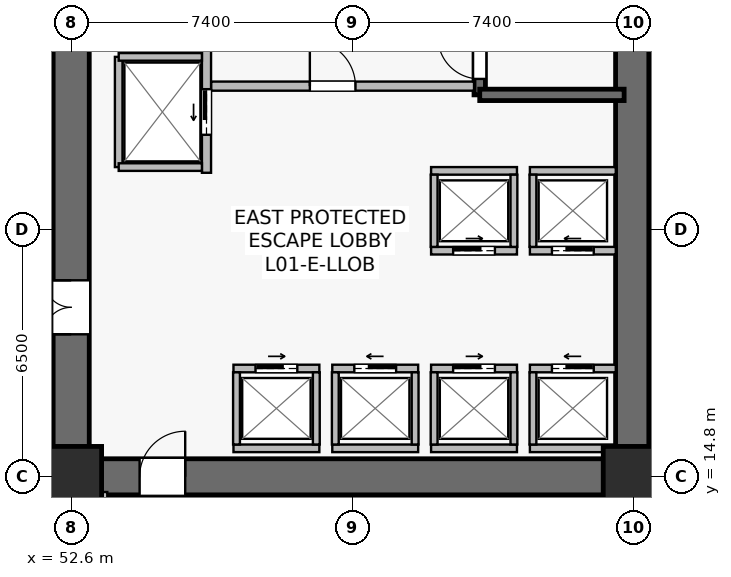
"""IFC4 building model, lengths in metres.
Left out: names, types, materials, properties, quantities, classifications, styles, units other than length and angle.
Written with IfcOpenShell. Run it as: python <this file> out.ifc"""

import sys

from ifc_helpers import new_model, si_unit, direction, frame, frame_2d, origin, origin_2d, place, context, subcontext, project, spatial, rectangle, extrude, source, transform, mapped, element, fill, save


model = new_model("IFC4")
c1 = context("Model", 3, precision=1e-05, world=origin(), true_north=direction((0.0, 1.0)))
c2 = subcontext(c1, "Body", "Model", "MODEL_VIEW")
j1 = project(units=[si_unit("LENGTHUNIT", "METRE"), si_unit("PLANEANGLEUNIT", "RADIAN")], contexts=[c1])
p1 = place(None, origin())
s1 = spatial("IfcSite", under=j1, at=p1, CompositionType="ELEMENT")
p2 = place(p1, origin())
s2 = spatial("IfcBuilding", under=s1, at=p2, CompositionType="ELEMENT")
p3 = place(p2, origin())
s3 = spatial("IfcBuildingStorey", under=s2, at=p3, CompositionType="ELEMENT", Elevation=0.0)
p4 = place(p3, frame((52.125, 14.8, 0.0), z_axis=(0.0, 0.0, 1.0), x_axis=(1.0, 0.0, 0.0)))
e1 = element("IfcWall", 1, at=p4, inside=s3, PredefinedType="SHEAR", context=c2, shape_type="SweptSolid", body=[
    extrude(rectangle(XDim=15.75, YDim=0.95, at=frame_2d((7.875, 0.0))), origin(), (0.0, 0.0, 1.0), 5.05),
])
p5 = place(p4, frame((2.275, 0.0, 0.0)))
e2 = element("IfcOpeningElement", 2, at=p5, cuts=e1, PredefinedType="OPENING", context=c2, shape_type="SweptSolid", body=[
    extrude(rectangle(XDim=1.2, YDim=2.16, at=frame_2d((0.6, 1.08))), frame((0.0, 0.485, 0.0), z_axis=(0.0, -1.0, 0.0), x_axis=(1.0, 0.0, 0.0)), (0.0, 0.0, 1.0), 0.97),
])
p6 = place(p3, frame((52.6, 15.275, 0.0), z_axis=(0.0, 0.0, 1.0), x_axis=(0.0, 1.0, 0.0)))
e3 = element("IfcWall", 3, at=p6, inside=s3, PredefinedType="SHEAR", context=c2, shape_type="SweptSolid", body=[
    extrude(rectangle(XDim=18.05, YDim=0.95, at=frame_2d((9.025, 0.0))), origin(), (0.0, 0.0, 1.0), 5.05),
])
p7 = place(p6, frame((3.275, 0.0, 0.0)))
e4 = element("IfcOpeningElement", 4, at=p7, cuts=e3, PredefinedType="OPENING", context=c2, shape_type="SweptSolid", body=[
    extrude(rectangle(XDim=1.42, YDim=2.2, at=frame_2d((0.71, 1.1))), frame((0.0, 0.485, 0.0), z_axis=(0.0, -1.0, 0.0), x_axis=(1.0, 0.0, 0.0)), (0.0, 0.0, 1.0), 0.97),
])
p8 = place(p3, frame((67.4, 15.275, 0.0), z_axis=(0.0, 0.0, 1.0), x_axis=(0.0, 1.0, 0.0)))
e5 = element("IfcWall", 5, at=p8, inside=s3, PredefinedType="SHEAR", context=c2, shape_type="SweptSolid", body=[
    extrude(rectangle(XDim=18.05, YDim=0.95, at=frame_2d((9.025, 0.0))), origin(), (0.0, 0.0, 1.0), 5.05),
])
p9 = place(p3, frame((63.35, 24.85, 0.0), z_axis=(0.0, 0.0, 1.0), x_axis=(0.0, 1.0, 0.0)))
e6 = element("IfcWall", 6, at=p9, inside=s3, PredefinedType="SHEAR", context=c2, shape_type="SweptSolid", body=[
    extrude(rectangle(XDim=8.63, YDim=0.3, at=frame_2d((4.315, 0.0))), origin(), (0.0, 0.0, 1.0), 5.05),
])
p10 = place(p9, frame((0.42, 0.0, 0.0)))
e7 = element("IfcOpeningElement", 7, at=p10, cuts=e6, PredefinedType="OPENING", context=c2, shape_type="SweptSolid", body=[
    extrude(rectangle(XDim=1.1, YDim=2.15, at=frame_2d((0.55, 1.075))), frame((0.0, 0.16, 0.0), z_axis=(0.0, -1.0, 0.0), x_axis=(1.0, 0.0, 0.0)), (0.0, 0.0, 1.0), 0.32),
])
p11 = place(p3, frame((63.35, 24.85, 0.0), z_axis=(0.0, 0.0, 1.0), x_axis=(1.0, 0.0, 0.0)))
e8 = element("IfcWall", 8, at=p11, inside=s3, PredefinedType="SHEAR", context=c2, shape_type="SweptSolid", body=[
    extrude(rectangle(XDim=3.8, YDim=0.3, at=frame_2d((1.9, 0.0))), origin(), (0.0, 0.0, 1.0), 5.05),
])
p12 = place(p3, frame((68.0, 6.0, 0.0), z_axis=(0.0, 0.0, 1.0), x_axis=(0.0, 1.0, 0.0)))
e9 = element("IfcWall", 9, at=p12, inside=s3, PredefinedType="SHEAR", context=c2, shape_type="SweptSolid", body=[
    extrude(rectangle(XDim=43.0, YDim=0.4, at=frame_2d((21.5, 0.0))), origin(), (0.0, 0.0, 1.0), 5.05),
])
m1 = source(origin(), c2, "Body", "SweptSolid", [
    extrude(rectangle(XDim=1.6, YDim=1.6, at=origin_2d()), origin(), (0.0, 0.0, 1.0), 5.4),
])
for number, where, z_axis, x_axis in (
    (10, (52.6, 14.8, 0.0), (0.0, 0.0, 1.0), (1.0, 0.0, 0.0)),
    (11, (67.4, 14.8, 0.0), (0.0, 0.0, 1.0), (1.0, 0.0, 0.0)),
):
    element("IfcColumn", number, at=place(p3, frame(where, z_axis=z_axis, x_axis=x_axis)), inside=s3, PredefinedType="COLUMN", context=c2, shape_type="MappedRepresentation", body=[
        mapped(m1, transform((0.0, 0.0, 0.0), scale=1.0)),
    ])
p13 = place(p3, frame((56.28, 25.08, 0.0), z_axis=(0.0, 0.0, 1.0), x_axis=(1.0, 0.0, 0.0)))
e12 = element("IfcWall", 12, at=p13, inside=s3, PredefinedType="SOLIDWALL", context=c2, shape_type="SweptSolid", body=[
    extrude(rectangle(XDim=6.92, YDim=0.24, at=frame_2d((3.46, 0.0))), origin(), (0.0, 0.0, 1.0), 4.335),
])
p14 = place(p13, frame((2.6, 0.0, 0.0)))
e13 = element("IfcOpeningElement", 13, at=p14, cuts=e12, PredefinedType="OPENING", context=c2, shape_type="SweptSolid", body=[
    extrude(rectangle(XDim=1.2, YDim=2.16, at=frame_2d((0.6, 1.08))), frame((0.0, 0.13, 0.0), z_axis=(0.0, -1.0, 0.0), x_axis=(1.0, 0.0, 0.0)), (0.0, 0.0, 1.0), 0.26),
])
p15 = place(p3, frame((56.16, 22.8, 0.0), z_axis=(0.0, 0.0, 1.0), x_axis=(0.0, 1.0, 0.0)))
e14 = element("IfcWall", 14, at=p15, inside=s3, PredefinedType="SOLIDWALL", context=c2, shape_type="SweptSolid", body=[
    extrude(rectangle(XDim=6.85, YDim=0.24, at=frame_2d((3.425, 0.0))), origin(), (0.0, 0.0, 1.0), 4.135),
])
p16 = place(p15, frame((4.85, 0.0, 0.0)))
e15 = element("IfcOpeningElement", 15, at=p16, cuts=e14, PredefinedType="OPENING", context=c2, shape_type="SweptSolid", body=[
    extrude(rectangle(XDim=1.1, YDim=2.22, at=frame_2d((0.55, 1.11))), frame((0.0, 0.13, 0.0), z_axis=(0.0, -1.0, 0.0), x_axis=(1.0, 0.0, 0.0)), (0.0, 0.0, 1.0), 0.26),
])
p17 = place(p15, frame((1.0, 0.0, 0.0)))
e16 = element("IfcOpeningElement", 16, at=p17, cuts=e14, PredefinedType="OPENING", context=c2, shape_type="SweptSolid", body=[
    extrude(rectangle(XDim=1.2, YDim=2.22, at=frame_2d((0.6, 1.11))), frame((0.0, 0.13, 0.0), z_axis=(0.0, -1.0, 0.0), x_axis=(1.0, 0.0, 0.0)), (0.0, 0.0, 1.0), 0.26),
])
p18 = place(p3, frame((64.67, 17.65, 0.0), z_axis=(0.0, 0.0, 1.0), x_axis=(1.0, 0.0, 0.0)))
e17 = element("IfcWall", 17, at=p18, inside=s3, PredefinedType="SOLIDWALL", context=c2, shape_type="SweptSolid", body=[
    extrude(rectangle(XDim=2.26, YDim=0.2, at=frame_2d((1.13, 0.0))), origin(), (0.0, 0.0, 1.0), 5.05),
])
p19 = place(p18, frame((0.58, 0.0, 0.0)))
e18 = element("IfcOpeningElement", 18, at=p19, cuts=e17, PredefinedType="OPENING", context=c2, shape_type="SweptSolid", body=[
    extrude(rectangle(XDim=1.1, YDim=2.22, at=frame_2d((0.55, 1.11))), frame((0.0, 0.11, 0.0), z_axis=(0.0, -1.0, 0.0), x_axis=(1.0, 0.0, 0.0)), (0.0, 0.0, 1.0), 0.22),
])
p20 = place(p3, frame((64.67, 15.55, 0.0), z_axis=(0.0, 0.0, 1.0), x_axis=(1.0, 0.0, 0.0)))
e19 = element("IfcWall", 19, at=p20, inside=s3, PredefinedType="SOLIDWALL", context=c2, shape_type="SweptSolid", body=[
    extrude(rectangle(XDim=2.26, YDim=0.2, at=frame_2d((1.13, 0.0))), origin(), (0.0, 0.0, 1.0), 5.05),
])
p21 = place(p3, frame((64.75, 15.65, 0.0), z_axis=(0.0, 0.0, 1.0), x_axis=(0.0, 1.0, 0.0)))
e20 = element("IfcWall", 20, at=p21, inside=s3, PredefinedType="SOLIDWALL", context=c2, shape_type="SweptSolid", body=[
    extrude(rectangle(XDim=1.9, YDim=0.18, at=frame_2d((0.95, 0.0))), origin(), (0.0, 0.0, 1.0), 5.05),
])
p22 = place(p3, frame((62.07, 17.65, 0.0), z_axis=(0.0, 0.0, 1.0), x_axis=(1.0, 0.0, 0.0)))
e21 = element("IfcWall", 21, at=p22, inside=s3, PredefinedType="SOLIDWALL", context=c2, shape_type="SweptSolid", body=[
    extrude(rectangle(XDim=2.26, YDim=0.2, at=frame_2d((1.13, 0.0))), origin(), (0.0, 0.0, 1.0), 5.05),
])
p23 = place(p22, frame((0.58, 0.0, 0.0)))
e22 = element("IfcOpeningElement", 22, at=p23, cuts=e21, PredefinedType="OPENING", context=c2, shape_type="SweptSolid", body=[
    extrude(rectangle(XDim=1.1, YDim=2.22, at=frame_2d((0.55, 1.11))), frame((0.0, 0.11, 0.0), z_axis=(0.0, -1.0, 0.0), x_axis=(1.0, 0.0, 0.0)), (0.0, 0.0, 1.0), 0.22),
])
p24 = place(p3, frame((62.07, 15.55, 0.0), z_axis=(0.0, 0.0, 1.0), x_axis=(1.0, 0.0, 0.0)))
e23 = element("IfcWall", 23, at=p24, inside=s3, PredefinedType="SOLIDWALL", context=c2, shape_type="SweptSolid", body=[
    extrude(rectangle(XDim=2.26, YDim=0.2, at=frame_2d((1.13, 0.0))), origin(), (0.0, 0.0, 1.0), 5.05),
])
for number, where, z_axis, x_axis in (
    (24, (62.15, 15.65, 0.0), (0.0, 0.0, 1.0), (0.0, 1.0, 0.0)),
    (25, (64.25, 15.65, 0.0), (0.0, 0.0, 1.0), (0.0, 1.0, 0.0)),
):
    element("IfcWall", number, at=place(p3, frame(where, z_axis=z_axis, x_axis=x_axis)), inside=s3, PredefinedType="SOLIDWALL", context=c2, shape_type="SweptSolid", body=[
        extrude(rectangle(XDim=1.9, YDim=0.18, at=frame_2d((0.95, 0.0))), origin(), (0.0, 0.0, 1.0), 5.05),
    ])
p25 = place(p3, frame((59.47, 17.65, 0.0), z_axis=(0.0, 0.0, 1.0), x_axis=(1.0, 0.0, 0.0)))
e26 = element("IfcWall", 26, at=p25, inside=s3, PredefinedType="SOLIDWALL", context=c2, shape_type="SweptSolid", body=[
    extrude(rectangle(XDim=2.26, YDim=0.2, at=frame_2d((1.13, 0.0))), origin(), (0.0, 0.0, 1.0), 4.335),
])
p26 = place(p25, frame((0.58, 0.0, 0.0)))
e27 = element("IfcOpeningElement", 27, at=p26, cuts=e26, PredefinedType="OPENING", context=c2, shape_type="SweptSolid", body=[
    extrude(rectangle(XDim=1.1, YDim=2.22, at=frame_2d((0.55, 1.11))), frame((0.0, 0.11, 0.0), z_axis=(0.0, -1.0, 0.0), x_axis=(1.0, 0.0, 0.0)), (0.0, 0.0, 1.0), 0.22),
])
p27 = place(p3, frame((59.47, 15.55, 0.0), z_axis=(0.0, 0.0, 1.0), x_axis=(1.0, 0.0, 0.0)))
e28 = element("IfcWall", 28, at=p27, inside=s3, PredefinedType="SOLIDWALL", context=c2, shape_type="SweptSolid", body=[
    extrude(rectangle(XDim=2.26, YDim=0.2, at=frame_2d((1.13, 0.0))), origin(), (0.0, 0.0, 1.0), 4.335),
])
for number, where, z_axis, x_axis in (
    (29, (59.55, 15.65, 0.0), (0.0, 0.0, 1.0), (0.0, 1.0, 0.0)),
    (30, (61.65, 15.65, 0.0), (0.0, 0.0, 1.0), (0.0, 1.0, 0.0)),
):
    element("IfcWall", number, at=place(p3, frame(where, z_axis=z_axis, x_axis=x_axis)), inside=s3, PredefinedType="SOLIDWALL", context=c2, shape_type="SweptSolid", body=[
        extrude(rectangle(XDim=1.9, YDim=0.18, at=frame_2d((0.95, 0.0))), origin(), (0.0, 0.0, 1.0), 5.05),
    ])
p28 = place(p3, frame((56.87, 17.65, 0.0), z_axis=(0.0, 0.0, 1.0), x_axis=(1.0, 0.0, 0.0)))
e31 = element("IfcWall", 31, at=p28, inside=s3, PredefinedType="SOLIDWALL", context=c2, shape_type="SweptSolid", body=[
    extrude(rectangle(XDim=2.26, YDim=0.2, at=frame_2d((1.13, 0.0))), origin(), (0.0, 0.0, 1.0), 5.05),
])
p29 = place(p28, frame((0.58, 0.0, 0.0)))
e32 = element("IfcOpeningElement", 32, at=p29, cuts=e31, PredefinedType="OPENING", context=c2, shape_type="SweptSolid", body=[
    extrude(rectangle(XDim=1.1, YDim=2.22, at=frame_2d((0.55, 1.11))), frame((0.0, 0.11, 0.0), z_axis=(0.0, -1.0, 0.0), x_axis=(1.0, 0.0, 0.0)), (0.0, 0.0, 1.0), 0.22),
])
p30 = place(p3, frame((56.87, 15.55, 0.0), z_axis=(0.0, 0.0, 1.0), x_axis=(1.0, 0.0, 0.0)))
e33 = element("IfcWall", 33, at=p30, inside=s3, PredefinedType="SOLIDWALL", context=c2, shape_type="SweptSolid", body=[
    extrude(rectangle(XDim=2.26, YDim=0.2, at=frame_2d((1.13, 0.0))), origin(), (0.0, 0.0, 1.0), 5.05),
])
for number, where, z_axis, x_axis in (
    (34, (56.95, 15.65, 0.0), (0.0, 0.0, 1.0), (0.0, 1.0, 0.0)),
    (35, (59.05, 15.65, 0.0), (0.0, 0.0, 1.0), (0.0, 1.0, 0.0)),
):
    element("IfcWall", number, at=place(p3, frame(where, z_axis=z_axis, x_axis=x_axis)), inside=s3, PredefinedType="SOLIDWALL", context=c2, shape_type="SweptSolid", body=[
        extrude(rectangle(XDim=1.9, YDim=0.18, at=frame_2d((0.95, 0.0))), origin(), (0.0, 0.0, 1.0), 5.05),
    ])
p31 = place(p3, frame((64.67, 20.75, 0.0), z_axis=(0.0, 0.0, 1.0), x_axis=(1.0, 0.0, 0.0)))
e36 = element("IfcWall", 36, at=p31, inside=s3, PredefinedType="SOLIDWALL", context=c2, shape_type="SweptSolid", body=[
    extrude(rectangle(XDim=2.26, YDim=0.2, at=frame_2d((1.13, 0.0))), origin(), (0.0, 0.0, 1.0), 5.05),
])
p32 = place(p31, frame((0.58, 0.0, 0.0)))
e37 = element("IfcOpeningElement", 37, at=p32, cuts=e36, PredefinedType="OPENING", context=c2, shape_type="SweptSolid", body=[
    extrude(rectangle(XDim=1.1, YDim=2.22, at=frame_2d((0.55, 1.11))), frame((0.0, 0.11, 0.0), z_axis=(0.0, -1.0, 0.0), x_axis=(1.0, 0.0, 0.0)), (0.0, 0.0, 1.0), 0.22),
])
p33 = place(p3, frame((64.67, 22.85, 0.0), z_axis=(0.0, 0.0, 1.0), x_axis=(1.0, 0.0, 0.0)))
e38 = element("IfcWall", 38, at=p33, inside=s3, PredefinedType="SOLIDWALL", context=c2, shape_type="SweptSolid", body=[
    extrude(rectangle(XDim=2.26, YDim=0.2, at=frame_2d((1.13, 0.0))), origin(), (0.0, 0.0, 1.0), 5.05),
])
p34 = place(p3, frame((64.75, 20.85, 0.0), z_axis=(0.0, 0.0, 1.0), x_axis=(0.0, 1.0, 0.0)))
e39 = element("IfcWall", 39, at=p34, inside=s3, PredefinedType="SOLIDWALL", context=c2, shape_type="SweptSolid", body=[
    extrude(rectangle(XDim=1.9, YDim=0.18, at=frame_2d((0.95, 0.0))), origin(), (0.0, 0.0, 1.0), 5.05),
])
p35 = place(p3, frame((62.07, 20.75, 0.0), z_axis=(0.0, 0.0, 1.0), x_axis=(1.0, 0.0, 0.0)))
e40 = element("IfcWall", 40, at=p35, inside=s3, PredefinedType="SOLIDWALL", context=c2, shape_type="SweptSolid", body=[
    extrude(rectangle(XDim=2.26, YDim=0.2, at=frame_2d((1.13, 0.0))), origin(), (0.0, 0.0, 1.0), 5.05),
])
p36 = place(p35, frame((0.58, 0.0, 0.0)))
e41 = element("IfcOpeningElement", 41, at=p36, cuts=e40, PredefinedType="OPENING", context=c2, shape_type="SweptSolid", body=[
    extrude(rectangle(XDim=1.1, YDim=2.22, at=frame_2d((0.55, 1.11))), frame((0.0, 0.11, 0.0), z_axis=(0.0, -1.0, 0.0), x_axis=(1.0, 0.0, 0.0)), (0.0, 0.0, 1.0), 0.22),
])
p37 = place(p3, frame((62.07, 22.85, 0.0), z_axis=(0.0, 0.0, 1.0), x_axis=(1.0, 0.0, 0.0)))
e42 = element("IfcWall", 42, at=p37, inside=s3, PredefinedType="SOLIDWALL", context=c2, shape_type="SweptSolid", body=[
    extrude(rectangle(XDim=2.26, YDim=0.2, at=frame_2d((1.13, 0.0))), origin(), (0.0, 0.0, 1.0), 5.05),
])
for number, where, z_axis, x_axis in (
    (43, (62.15, 20.85, 0.0), (0.0, 0.0, 1.0), (0.0, 1.0, 0.0)),
    (44, (64.25, 20.85, 0.0), (0.0, 0.0, 1.0), (0.0, 1.0, 0.0)),
):
    element("IfcWall", number, at=place(p3, frame(where, z_axis=z_axis, x_axis=x_axis)), inside=s3, PredefinedType="SOLIDWALL", context=c2, shape_type="SweptSolid", body=[
        extrude(rectangle(XDim=1.9, YDim=0.18, at=frame_2d((0.95, 0.0))), origin(), (0.0, 0.0, 1.0), 5.05),
    ])
p38 = place(p3, frame((53.85, 22.95, 0.0), z_axis=(0.0, 0.0, 1.0), x_axis=(0.0, 1.0, 0.0)))
e45 = element("IfcWall", 45, at=p38, inside=s3, PredefinedType="SOLIDWALL", context=c2, shape_type="SweptSolid", body=[
    extrude(rectangle(XDim=2.9, YDim=0.2, at=frame_2d((1.45, 0.0))), origin(), (0.0, 0.0, 1.0), 4.135),
])
for number, where, z_axis, x_axis in (
    (46, (53.85, 25.85, 0.0), (0.0, 0.0, 1.0), (1.0, 0.0, 0.0)),
    (47, (53.85, 22.95, 0.0), (0.0, 0.0, 1.0), (1.0, 0.0, 0.0)),
):
    element("IfcWall", number, at=place(p3, frame(where, z_axis=z_axis, x_axis=x_axis)), inside=s3, PredefinedType="SOLIDWALL", context=c2, shape_type="SweptSolid", body=[
        extrude(rectangle(XDim=2.19, YDim=0.2, at=frame_2d((1.095, 0.0))), origin(), (0.0, 0.0, 1.0), 5.05),
    ])
p39 = place(p3, frame((53.45, 11.35, 0.0), z_axis=(0.0, 0.0, 1.0), x_axis=(0.0, 1.0, 0.0)))
e48 = element("IfcWall", 48, at=p39, inside=s3, PredefinedType="SOLIDWALL", context=c2, shape_type="SweptSolid", body=[
    extrude(rectangle(XDim=3.05, YDim=0.2, at=frame_2d((1.525, 0.0))), origin(), (0.0, 0.0, 1.0), 5.05),
])
p40 = place(p39, frame((0.45, 0.0, 0.0)))
e49 = element("IfcOpeningElement", 49, at=p40, cuts=e48, PredefinedType="OPENING", context=c2, shape_type="SweptSolid", body=[
    extrude(rectangle(XDim=1.42, YDim=2.2, at=frame_2d((0.71, 1.1))), frame((0.0, 0.11, 0.0), z_axis=(0.0, -1.0, 0.0), x_axis=(1.0, 0.0, 0.0)), (0.0, 0.0, 1.0), 0.22),
])
m2 = source(origin(), c2, "Body", "SweptSolid", [
    extrude(rectangle(XDim=1.1, YDim=2.15, at=frame_2d((0.55, 1.075))), frame((0.0, 0.025, 0.0), z_axis=(0.0, -1.0, 0.0), x_axis=(1.0, 0.0, 0.0)), (0.0, 0.0, 1.0), 0.05),
])
p41 = place(p10, origin())
e50 = element("IfcDoor", 50, at=p41, inside=s3, OperationType="SINGLE_SWING_RIGHT", PredefinedType="DOOR", context=c2, shape_type="MappedRepresentation", body=[
    mapped(m2, transform((0.0, 0.0, 0.0), scale=1.0)),
])
fill(e7, e50)
m3 = source(origin(), c2, "Body", "SweptSolid", [
    extrude(rectangle(XDim=1.2, YDim=2.16, at=frame_2d((0.6, 1.08))), frame((0.0, 0.025, 0.0), z_axis=(0.0, -1.0, 0.0), x_axis=(1.0, 0.0, 0.0)), (0.0, 0.0, 1.0), 0.05),
])
p42 = place(p14, origin())
e51 = element("IfcDoor", 51, at=p42, inside=s3, OperationType="SINGLE_SWING_LEFT", PredefinedType="DOOR", context=c2, shape_type="MappedRepresentation", body=[
    mapped(m3, transform((0.0, 0.0, 0.0), scale=1.0)),
])
fill(e13, e51)
m4 = source(origin(), c2, "Body", "SweptSolid", [
    extrude(rectangle(XDim=1.1, YDim=2.22, at=frame_2d((0.55, 1.11))), frame((0.0, 0.025, 0.0), z_axis=(0.0, -1.0, 0.0), x_axis=(1.0, 0.0, 0.0)), (0.0, 0.0, 1.0), 0.05),
])
p43 = place(p19, origin())
e52 = element("IfcDoor", 52, at=p43, inside=s3, OperationType="SLIDING_TO_LEFT", PredefinedType="USERDEFINED", context=c2, shape_type="MappedRepresentation", body=[
    mapped(m4, transform((0.0, 0.0, 0.0), scale=1.0)),
])
fill(e18, e52)
p44 = place(p23, origin())
e53 = element("IfcDoor", 53, at=p44, inside=s3, OperationType="SLIDING_TO_RIGHT", PredefinedType="USERDEFINED", context=c2, shape_type="MappedRepresentation", body=[
    mapped(m4, transform((0.0, 0.0, 0.0), scale=1.0)),
])
fill(e22, e53)
p45 = place(p26, origin())
e54 = element("IfcDoor", 54, at=p45, inside=s3, OperationType="SLIDING_TO_LEFT", PredefinedType="USERDEFINED", context=c2, shape_type="MappedRepresentation", body=[
    mapped(m4, transform((0.0, 0.0, 0.0), scale=1.0)),
])
fill(e27, e54)
p46 = place(p29, origin())
e55 = element("IfcDoor", 55, at=p46, inside=s3, OperationType="SLIDING_TO_RIGHT", PredefinedType="USERDEFINED", context=c2, shape_type="MappedRepresentation", body=[
    mapped(m4, transform((0.0, 0.0, 0.0), scale=1.0)),
])
fill(e32, e55)
p47 = place(p32, origin())
e56 = element("IfcDoor", 56, at=p47, inside=s3, OperationType="SLIDING_TO_LEFT", PredefinedType="USERDEFINED", context=c2, shape_type="MappedRepresentation", body=[
    mapped(m4, transform((0.0, 0.0, 0.0), scale=1.0)),
])
fill(e37, e56)
p48 = place(p36, origin())
e57 = element("IfcDoor", 57, at=p48, inside=s3, OperationType="SLIDING_TO_RIGHT", PredefinedType="USERDEFINED", context=c2, shape_type="MappedRepresentation", body=[
    mapped(m4, transform((0.0, 0.0, 0.0), scale=1.0)),
])
fill(e41, e57)
m5 = source(origin(), c2, "Body", "SweptSolid", [
    extrude(rectangle(XDim=1.2, YDim=2.22, at=frame_2d((0.6, 1.11))), frame((0.0, 0.025, 0.0), z_axis=(0.0, -1.0, 0.0), x_axis=(1.0, 0.0, 0.0)), (0.0, 0.0, 1.0), 0.05),
])
p49 = place(p17, origin())
e58 = element("IfcDoor", 58, at=p49, inside=s3, OperationType="SLIDING_TO_LEFT", PredefinedType="USERDEFINED", context=c2, shape_type="MappedRepresentation", body=[
    mapped(m5, transform((0.0, 0.0, 0.0), scale=1.0)),
])
fill(e16, e58)
p50 = place(p5, origin())
e59 = element("IfcDoor", 59, at=p50, inside=s3, OperationType="SINGLE_SWING_RIGHT", PredefinedType="DOOR", context=c2, shape_type="MappedRepresentation", body=[
    mapped(m3, transform((0.0, 0.0, 0.0), scale=1.0)),
])
fill(e2, e59)
m6 = source(origin(), c2, "Body", "SweptSolid", [
    extrude(rectangle(XDim=1.42, YDim=2.2, at=frame_2d((0.71, 1.1))), frame((0.0, 0.025, 0.0), z_axis=(0.0, -1.0, 0.0), x_axis=(1.0, 0.0, 0.0)), (0.0, 0.0, 1.0), 0.05),
])
p51 = place(p7, origin())
e60 = element("IfcDoor", 60, at=p51, inside=s3, OperationType="DOUBLE_DOOR_SINGLE_SWING", PredefinedType="DOOR", context=c2, shape_type="MappedRepresentation", body=[
    mapped(m6, transform((0.0, 0.0, 0.0), scale=1.0)),
])
fill(e4, e60)
save(model, sys.argv[1])
